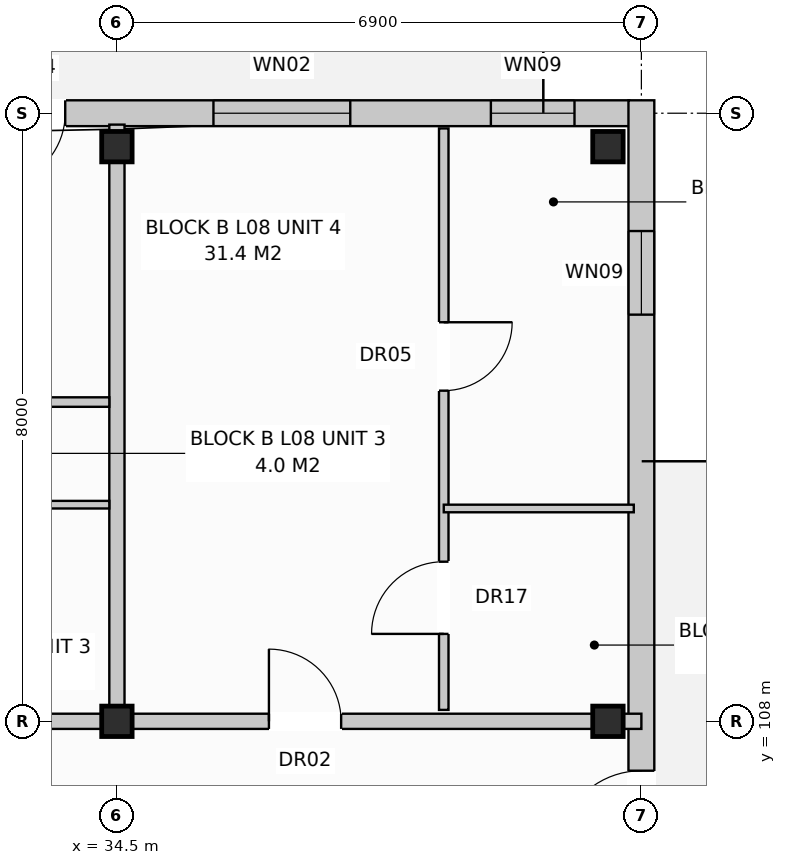
"""IFC4 building model, lengths in metres.
Left out: names, types, materials, properties, quantities, classifications, styles, units other than length and angle.
Written with IfcOpenShell. Run it as: python <this file> out.ifc"""

import sys

from ifc_helpers import new_model, si_unit, direction, frame, frame_2d, origin, origin_with_axes, origin_2d, place, context, subcontext, project, spatial, rectangle, extrude, element, fill, save


model = new_model("IFC4")
c1 = context("Model", 3, precision=1e-05, world=origin(), true_north=direction((0.0, 1.0)))
c2 = subcontext(c1, "Body", "Model", "MODEL_VIEW")
j1 = project(units=[si_unit("LENGTHUNIT", "METRE"), si_unit("PLANEANGLEUNIT", "RADIAN")], contexts=[c1])
p1 = place(None, origin())
s1 = spatial("IfcSite", under=j1, at=p1, CompositionType="ELEMENT")
p2 = place(p1, origin())
s2 = spatial("IfcBuilding", under=s1, at=p2, CompositionType="ELEMENT")
p3 = place(p2, frame((0.0, 0.0, 27.2)))
s3 = spatial("IfcBuildingStorey", under=s2, at=p3, CompositionType="ELEMENT", Elevation=27.2)
for number, where, z_axis, x_axis in (
    (1, (34.5, 108.0, 0.0), (0.0, 0.0, 1.0), (1.0, 0.0, 0.0)),
    (2, (34.5, 115.56, 0.0), (0.0, 0.0, 1.0), (1.0, 0.0, 0.0)),
    (3, (40.96, 108.0, 0.0), (0.0, 0.0, 1.0), (1.0, 0.0, 0.0)),
    (4, (40.96, 115.56, 0.0), (0.0, 0.0, 1.0), (1.0, 0.0, 0.0)),
):
    element("IfcColumn", number, at=place(p3, frame(where, z_axis=z_axis, x_axis=x_axis)), inside=s3, PredefinedType="COLUMN", context=c2, shape_type="SweptSolid", body=[
        extrude(rectangle(XDim=0.4, YDim=0.4, at=origin_2d()), origin(), (0.0, 0.0, 1.0), 3.2),
    ])
p4 = place(p3, frame((0.16, 116.0, 0.0), z_axis=(0.0, 0.0, 1.0), x_axis=(1.0, 0.0, 0.0)))
e5 = element("IfcWall", 5, at=p4, inside=s3, PredefinedType="STANDARD", context=c2, shape_type="SweptSolid", body=[
    extrude(rectangle(XDim=41.08, YDim=0.34, at=frame_2d((20.54, 0.0))), origin(), (0.0, 0.0, 1.0), 2.96),
])
p5 = place(p4, frame((2.5, 0.0, 0.0)))
e6 = element("IfcOpeningElement", 6, at=p5, cuts=e5, PredefinedType="OPENING", context=c2, shape_type="SweptSolid", body=[
    extrude(rectangle(XDim=0.95, YDim=2.1, at=frame_2d((0.475, 1.05))), frame((0.0, 0.182, 0.0), z_axis=(0.0, -1.0, 0.0), x_axis=(1.0, 0.0, 0.0)), (0.0, 0.0, 1.0), 0.364),
])
p6 = place(p4, frame((18.91, 0.0, 0.0)))
e7 = element("IfcOpeningElement", 7, at=p6, cuts=e5, PredefinedType="OPENING", context=c2, shape_type="SweptSolid", body=[
    extrude(rectangle(XDim=0.95, YDim=2.1, at=frame_2d((0.475, 1.05))), frame((0.0, 0.182, 0.0), z_axis=(0.0, -1.0, 0.0), x_axis=(1.0, 0.0, 0.0)), (0.0, 0.0, 1.0), 0.364),
])
p7 = place(p4, frame((32.71, 0.0, 0.0)))
e8 = element("IfcOpeningElement", 8, at=p7, cuts=e5, PredefinedType="OPENING", context=c2, shape_type="SweptSolid", body=[
    extrude(rectangle(XDim=0.95, YDim=2.1, at=frame_2d((0.475, 1.05))), frame((0.0, 0.182, 0.0), z_axis=(0.0, -1.0, 0.0), x_axis=(1.0, 0.0, 0.0)), (0.0, 0.0, 1.0), 0.364),
])
p8 = place(p4, frame((0.81, 0.0, 0.72)))
e9 = element("IfcOpeningElement", 9, at=p8, cuts=e5, PredefinedType="OPENING", context=c2, shape_type="SweptSolid", body=[
    extrude(rectangle(XDim=1.1, YDim=1.5, at=frame_2d((0.55, 0.75))), frame((0.0, 0.182, 0.0), z_axis=(0.0, -1.0, 0.0), x_axis=(1.0, 0.0, 0.0)), (0.0, 0.0, 1.0), 0.364),
])
p9 = place(p4, frame((4.235, 0.0, 0.8)))
e10 = element("IfcOpeningElement", 10, at=p9, cuts=e5, PredefinedType="OPENING", context=c2, shape_type="SweptSolid", body=[
    extrude(rectangle(XDim=1.95, YDim=1.65, at=frame_2d((0.975, 0.825))), frame((0.0, 0.182, 0.0), z_axis=(0.0, -1.0, 0.0), x_axis=(1.0, 0.0, 0.0)), (0.0, 0.0, 1.0), 0.364),
])
p10 = place(p4, frame((8.01, 0.0, 0.8)))
e11 = element("IfcOpeningElement", 11, at=p10, cuts=e5, PredefinedType="OPENING", context=c2, shape_type="SweptSolid", body=[
    extrude(rectangle(XDim=1.8, YDim=1.7, at=frame_2d((0.9, 0.85))), frame((0.0, 0.182, 0.0), z_axis=(0.0, -1.0, 0.0), x_axis=(1.0, 0.0, 0.0)), (0.0, 0.0, 1.0), 0.364),
])
p11 = place(p4, frame((11.66, 0.0, 0.72)))
e12 = element("IfcOpeningElement", 12, at=p11, cuts=e5, PredefinedType="OPENING", context=c2, shape_type="SweptSolid", body=[
    extrude(rectangle(XDim=1.1, YDim=1.5, at=frame_2d((0.55, 0.75))), frame((0.0, 0.182, 0.0), z_axis=(0.0, -1.0, 0.0), x_axis=(1.0, 0.0, 0.0)), (0.0, 0.0, 1.0), 0.364),
])
p12 = place(p4, frame((16.735, 0.0, 0.8)))
e13 = element("IfcOpeningElement", 13, at=p12, cuts=e5, PredefinedType="OPENING", context=c2, shape_type="SweptSolid", body=[
    extrude(rectangle(XDim=1.95, YDim=1.65, at=frame_2d((0.975, 0.825))), frame((0.0, 0.182, 0.0), z_axis=(0.0, -1.0, 0.0), x_axis=(1.0, 0.0, 0.0)), (0.0, 0.0, 1.0), 0.364),
])
p13 = place(p4, frame((22.31, 0.0, 0.8)))
e14 = element("IfcOpeningElement", 14, at=p13, cuts=e5, PredefinedType="OPENING", context=c2, shape_type="SweptSolid", body=[
    extrude(rectangle(XDim=1.8, YDim=1.7, at=frame_2d((0.9, 0.85))), frame((0.0, 0.182, 0.0), z_axis=(0.0, -1.0, 0.0), x_axis=(1.0, 0.0, 0.0)), (0.0, 0.0, 1.0), 0.364),
])
p14 = place(p4, frame((28.36, 0.0, 0.72)))
e15 = element("IfcOpeningElement", 15, at=p14, cuts=e5, PredefinedType="OPENING", context=c2, shape_type="SweptSolid", body=[
    extrude(rectangle(XDim=1.1, YDim=1.5, at=frame_2d((0.55, 0.75))), frame((0.0, 0.182, 0.0), z_axis=(0.0, -1.0, 0.0), x_axis=(1.0, 0.0, 0.0)), (0.0, 0.0, 1.0), 0.364),
])
p15 = place(p4, frame((30.435, 0.0, 0.8)))
e16 = element("IfcOpeningElement", 16, at=p15, cuts=e5, PredefinedType="OPENING", context=c2, shape_type="SweptSolid", body=[
    extrude(rectangle(XDim=1.95, YDim=1.65, at=frame_2d((0.975, 0.825))), frame((0.0, 0.182, 0.0), z_axis=(0.0, -1.0, 0.0), x_axis=(1.0, 0.0, 0.0)), (0.0, 0.0, 1.0), 0.364),
])
p16 = place(p4, frame((35.61, 0.0, 0.8)))
e17 = element("IfcOpeningElement", 17, at=p16, cuts=e5, PredefinedType="OPENING", context=c2, shape_type="SweptSolid", body=[
    extrude(rectangle(XDim=1.8, YDim=1.7, at=frame_2d((0.9, 0.85))), frame((0.0, 0.182, 0.0), z_axis=(0.0, -1.0, 0.0), x_axis=(1.0, 0.0, 0.0)), (0.0, 0.0, 1.0), 0.364),
])
p17 = place(p4, frame((39.26, 0.0, 0.72)))
e18 = element("IfcOpeningElement", 18, at=p17, cuts=e5, PredefinedType="OPENING", context=c2, shape_type="SweptSolid", body=[
    extrude(rectangle(XDim=1.1, YDim=1.5, at=frame_2d((0.55, 0.75))), frame((0.0, 0.182, 0.0), z_axis=(0.0, -1.0, 0.0), x_axis=(1.0, 0.0, 0.0)), (0.0, 0.0, 1.0), 0.364),
])
p18 = place(p3, frame((41.4, 97.43, 0.0), z_axis=(0.0, 0.0, 1.0), x_axis=(0.0, 1.0, 0.0)))
e19 = element("IfcWall", 19, at=p18, inside=s3, PredefinedType="STANDARD", context=c2, shape_type="SweptSolid", body=[
    extrude(rectangle(XDim=18.74, YDim=0.34, at=frame_2d((9.37, 0.0))), origin(), (0.0, 0.0, 1.0), 2.96),
])
p19 = place(p18, frame((8.82, 0.0, 0.0)))
e20 = element("IfcOpeningElement", 20, at=p19, cuts=e19, PredefinedType="OPENING", context=c2, shape_type="SweptSolid", body=[
    extrude(rectangle(XDim=1.1, YDim=2.1, at=frame_2d((0.55, 1.05))), frame((0.0, 0.182, 0.0), z_axis=(0.0, -1.0, 0.0), x_axis=(1.0, 0.0, 0.0)), (0.0, 0.0, 1.0), 0.364),
])
p20 = place(p18, frame((1.72, 0.0, 0.72)))
e21 = element("IfcOpeningElement", 21, at=p20, cuts=e19, PredefinedType="OPENING", context=c2, shape_type="SweptSolid", body=[
    extrude(rectangle(XDim=1.1, YDim=1.5, at=frame_2d((0.55, 0.75))), frame((0.0, 0.182, 0.0), z_axis=(0.0, -1.0, 0.0), x_axis=(1.0, 0.0, 0.0)), (0.0, 0.0, 1.0), 0.364),
])
p21 = place(p18, frame((15.92, 0.0, 0.72)))
e22 = element("IfcOpeningElement", 22, at=p21, cuts=e19, PredefinedType="OPENING", context=c2, shape_type="SweptSolid", body=[
    extrude(rectangle(XDim=1.1, YDim=1.5, at=frame_2d((0.55, 0.75))), frame((0.0, 0.182, 0.0), z_axis=(0.0, -1.0, 0.0), x_axis=(1.0, 0.0, 0.0)), (0.0, 0.0, 1.0), 0.364),
])
p22 = place(p3, frame((34.5, 108.15, 0.0), z_axis=(0.0, 0.0, 1.0), x_axis=(0.0, 1.0, 0.0)))
e23 = element("IfcWall", 23, at=p22, inside=s3, PredefinedType="PARTITIONING", context=c2, shape_type="SweptSolid", body=[
    extrude(rectangle(XDim=7.7, YDim=0.2, at=frame_2d((3.85, 0.0))), origin(), (0.0, 0.0, 1.0), 2.4),
])
p23 = place(p3, frame((20.7, 108.0, 0.0), z_axis=(0.0, 0.0, 1.0), x_axis=(1.0, 0.0, 0.0)))
e24 = element("IfcWall", 24, at=p23, inside=s3, PredefinedType="PARTITIONING", context=c2, shape_type="SweptSolid", body=[
    extrude(rectangle(XDim=13.8, YDim=0.2, at=frame_2d((6.9, 0.0))), origin(), (0.0, 0.0, 1.0), 2.4),
])
p24 = place(p23, frame((2.4, 0.0, 0.0)))
e25 = element("IfcOpeningElement", 25, at=p24, cuts=e24, PredefinedType="OPENING", context=c2, shape_type="SweptSolid", body=[
    extrude(rectangle(XDim=0.95, YDim=2.15, at=frame_2d((0.475, 1.075))), frame((0.0, 0.112, 0.0), z_axis=(0.0, -1.0, 0.0), x_axis=(1.0, 0.0, 0.0)), (0.0, 0.0, 1.0), 0.224),
])
p25 = place(p3, frame((25.9, 110.85, 0.0), z_axis=(0.0, 0.0, 1.0), x_axis=(1.0, 0.0, 0.0)))
e26 = element("IfcWall", 26, at=p25, inside=s3, PredefinedType="PARTITIONING", context=c2, shape_type="SweptSolid", body=[
    extrude(rectangle(XDim=8.5, YDim=0.1, at=frame_2d((4.25, 0.0))), origin(), (0.0, 0.0, 1.0), 2.96),
])
p26 = place(p25, frame((1.0, 0.0, 0.0)))
e27 = element("IfcOpeningElement", 27, at=p26, cuts=e26, PredefinedType="OPENING", context=c2, shape_type="SweptSolid", body=[
    extrude(rectangle(XDim=0.85, YDim=2.1, at=frame_2d((0.425, 1.05))), frame((0.0, 0.062, 0.0), z_axis=(0.0, -1.0, 0.0), x_axis=(1.0, 0.0, 0.0)), (0.0, 0.0, 1.0), 0.124),
])
p27 = place(p25, frame((3.4, 0.0, 0.0)))
e28 = element("IfcOpeningElement", 28, at=p27, cuts=e26, PredefinedType="OPENING", context=c2, shape_type="SweptSolid", body=[
    extrude(rectangle(XDim=0.85, YDim=2.05, at=frame_2d((0.425, 1.025))), frame((0.0, 0.062, 0.0), z_axis=(0.0, -1.0, 0.0), x_axis=(1.0, 0.0, 0.0)), (0.0, 0.0, 1.0), 0.124),
])
p28 = place(p25, frame((6.2, 0.0, 0.0)))
e29 = element("IfcOpeningElement", 29, at=p28, cuts=e26, PredefinedType="OPENING", context=c2, shape_type="SweptSolid", body=[
    extrude(rectangle(XDim=0.85, YDim=2.05, at=frame_2d((0.425, 1.025))), frame((0.0, 0.062, 0.0), z_axis=(0.0, -1.0, 0.0), x_axis=(1.0, 0.0, 0.0)), (0.0, 0.0, 1.0), 0.124),
])
p29 = place(p3, frame((25.9, 112.2, 0.0), z_axis=(0.0, 0.0, 1.0), x_axis=(1.0, 0.0, 0.0)))
e30 = element("IfcWall", 30, at=p29, inside=s3, PredefinedType="PARTITIONING", context=c2, shape_type="SweptSolid", body=[
    extrude(rectangle(XDim=8.5, YDim=0.125, at=frame_2d((4.25, 0.0))), origin(), (0.0, 0.0, 1.0), 2.96),
])
p30 = place(p29, frame((1.5, 0.0, 0.0)))
e31 = element("IfcOpeningElement", 31, at=p30, cuts=e30, PredefinedType="OPENING", context=c2, shape_type="SweptSolid", body=[
    extrude(rectangle(XDim=0.9, YDim=2.1, at=frame_2d((0.45, 1.05))), frame((0.0, 0.074, 0.0), z_axis=(0.0, -1.0, 0.0), x_axis=(1.0, 0.0, 0.0)), (0.0, 0.0, 1.0), 0.149),
])
p31 = place(p29, frame((5.6, 0.0, 0.0)))
e32 = element("IfcOpeningElement", 32, at=p31, cuts=e30, PredefinedType="OPENING", context=c2, shape_type="SweptSolid", body=[
    extrude(rectangle(XDim=0.9, YDim=2.1, at=frame_2d((0.45, 1.05))), frame((0.0, 0.074, 0.0), z_axis=(0.0, -1.0, 0.0), x_axis=(1.0, 0.0, 0.0)), (0.0, 0.0, 1.0), 0.149),
])
p32 = place(p3, frame((34.5, 108.0, 0.0), z_axis=(0.0, 0.0, 1.0), x_axis=(1.0, 0.0, 0.0)))
e33 = element("IfcWall", 33, at=p32, inside=s3, PredefinedType="PARTITIONING", context=c2, shape_type="SweptSolid", body=[
    extrude(rectangle(XDim=6.9, YDim=0.2, at=frame_2d((3.45, 0.0))), origin(), (0.0, 0.0, 1.0), 2.4),
])
p33 = place(p32, frame((2.0, 0.0, 0.0)))
e34 = element("IfcOpeningElement", 34, at=p33, cuts=e33, PredefinedType="OPENING", context=c2, shape_type="SweptSolid", body=[
    extrude(rectangle(XDim=0.95, YDim=2.15, at=frame_2d((0.475, 1.075))), frame((0.0, 0.112, 0.0), z_axis=(0.0, -1.0, 0.0), x_axis=(1.0, 0.0, 0.0)), (0.0, 0.0, 1.0), 0.224),
])
p34 = place(p3, frame((38.8, 108.15, 0.0), z_axis=(0.0, 0.0, 1.0), x_axis=(0.0, 1.0, 0.0)))
e35 = element("IfcWall", 35, at=p34, inside=s3, PredefinedType="PARTITIONING", context=c2, shape_type="SweptSolid", body=[
    extrude(rectangle(XDim=7.65, YDim=0.125, at=frame_2d((3.825, 0.0))), origin(), (0.0, 0.0, 1.0), 2.96),
])
p35 = place(p34, frame((1.0, 0.0, 0.0)))
e36 = element("IfcOpeningElement", 36, at=p35, cuts=e35, PredefinedType="OPENING", context=c2, shape_type="SweptSolid", body=[
    extrude(rectangle(XDim=0.95, YDim=2.1, at=frame_2d((0.475, 1.05))), frame((0.0, 0.074, 0.0), z_axis=(0.0, -1.0, 0.0), x_axis=(1.0, 0.0, 0.0)), (0.0, 0.0, 1.0), 0.149),
])
p36 = place(p34, frame((4.2, 0.0, 0.0)))
e37 = element("IfcOpeningElement", 37, at=p36, cuts=e35, PredefinedType="OPENING", context=c2, shape_type="SweptSolid", body=[
    extrude(rectangle(XDim=0.9, YDim=2.1, at=frame_2d((0.45, 1.05))), frame((0.0, 0.074, 0.0), z_axis=(0.0, -1.0, 0.0), x_axis=(1.0, 0.0, 0.0)), (0.0, 0.0, 1.0), 0.149),
])
p37 = place(p3, frame((38.8, 110.8, 0.0), z_axis=(0.0, 0.0, 1.0), x_axis=(1.0, 0.0, 0.0)))
e38 = element("IfcWall", 38, at=p37, inside=s3, PredefinedType="PARTITIONING", context=c2, shape_type="SweptSolid", body=[
    extrude(rectangle(XDim=2.5, YDim=0.1, at=frame_2d((1.25, 0.0))), origin(), (0.0, 0.0, 1.0), 2.96),
])
p38 = place(p7, frame((0.95, 0.0, 0.0), z_axis=(0.0, 0.0, 1.0), x_axis=(-1.0, 0.0, 0.0)))
e39 = element("IfcDoor", 39, at=p38, inside=s3, OperationType="SINGLE_SWING_LEFT", PredefinedType="DOOR", context=c2, shape_type="SweptSolid", body=[
    extrude(rectangle(XDim=0.95, YDim=2.1, at=frame_2d((0.475, 1.05))), frame((0.0, 0.025, 0.0), z_axis=(0.0, -1.0, 0.0), x_axis=(1.0, 0.0, 0.0)), (0.0, 0.0, 1.0), 0.05),
])
fill(e8, e39)
p39 = place(p16, origin_with_axes())
e40 = element("IfcWindow", 40, at=p39, inside=s3, PartitioningType="SINGLE_PANEL", PredefinedType="WINDOW", context=c2, shape_type="SweptSolid", body=[
    extrude(rectangle(XDim=1.8, YDim=1.7, at=frame_2d((0.9, 0.85))), frame((0.0, 0.03, 0.0), z_axis=(0.0, -1.0, 0.0), x_axis=(1.0, 0.0, 0.0)), (0.0, 0.0, 1.0), 0.06),
])
fill(e17, e40)
p40 = place(p17, origin_with_axes())
e41 = element("IfcWindow", 41, at=p40, inside=s3, PartitioningType="SINGLE_PANEL", PredefinedType="WINDOW", context=c2, shape_type="SweptSolid", body=[
    extrude(rectangle(XDim=1.1, YDim=1.5, at=frame_2d((0.55, 0.75))), frame((0.0, 0.03, 0.0), z_axis=(0.0, -1.0, 0.0), x_axis=(1.0, 0.0, 0.0)), (0.0, 0.0, 1.0), 0.06),
])
fill(e18, e41)
p41 = place(p19, origin_with_axes())
e42 = element("IfcDoor", 42, at=p41, inside=s3, OperationType="SINGLE_SWING_LEFT", PredefinedType="DOOR", context=c2, shape_type="SweptSolid", body=[
    extrude(rectangle(XDim=1.1, YDim=2.1, at=frame_2d((0.55, 1.05))), frame((0.0, 0.025, 0.0), z_axis=(0.0, -1.0, 0.0), x_axis=(1.0, 0.0, 0.0)), (0.0, 0.0, 1.0), 0.05),
])
fill(e20, e42)
p42 = place(p21, origin_with_axes())
e43 = element("IfcWindow", 43, at=p42, inside=s3, PartitioningType="SINGLE_PANEL", PredefinedType="WINDOW", context=c2, shape_type="SweptSolid", body=[
    extrude(rectangle(XDim=1.1, YDim=1.5, at=frame_2d((0.55, 0.75))), frame((0.0, 0.03, 0.0), z_axis=(0.0, -1.0, 0.0), x_axis=(1.0, 0.0, 0.0)), (0.0, 0.0, 1.0), 0.06),
])
fill(e22, e43)
p43 = place(p33, origin_with_axes())
e44 = element("IfcDoor", 44, at=p43, inside=s3, OperationType="SINGLE_SWING_LEFT", PredefinedType="DOOR", context=c2, shape_type="SweptSolid", body=[
    extrude(rectangle(XDim=0.95, YDim=2.15, at=frame_2d((0.475, 1.075))), frame((0.0, 0.025, 0.0), z_axis=(0.0, -1.0, 0.0), x_axis=(1.0, 0.0, 0.0)), (0.0, 0.0, 1.0), 0.05),
])
fill(e34, e44)
p44 = place(p35, origin_with_axes())
e45 = element("IfcDoor", 45, at=p44, inside=s3, OperationType="SINGLE_SWING_LEFT", PredefinedType="DOOR", context=c2, shape_type="SweptSolid", body=[
    extrude(rectangle(XDim=0.95, YDim=2.1, at=frame_2d((0.475, 1.05))), frame((0.0, 0.025, 0.0), z_axis=(0.0, -1.0, 0.0), x_axis=(1.0, 0.0, 0.0)), (0.0, 0.0, 1.0), 0.05),
])
fill(e36, e45)
p45 = place(p36, frame((0.9, 0.0, 0.0), z_axis=(0.0, 0.0, 1.0), x_axis=(-1.0, 0.0, 0.0)))
e46 = element("IfcDoor", 46, at=p45, inside=s3, OperationType="SINGLE_SWING_RIGHT", PredefinedType="DOOR", context=c2, shape_type="SweptSolid", body=[
    extrude(rectangle(XDim=0.9, YDim=2.1, at=frame_2d((0.45, 1.05))), frame((0.0, 0.025, 0.0), z_axis=(0.0, -1.0, 0.0), x_axis=(1.0, 0.0, 0.0)), (0.0, 0.0, 1.0), 0.05),
])
fill(e37, e46)
save(model, sys.argv[1])
